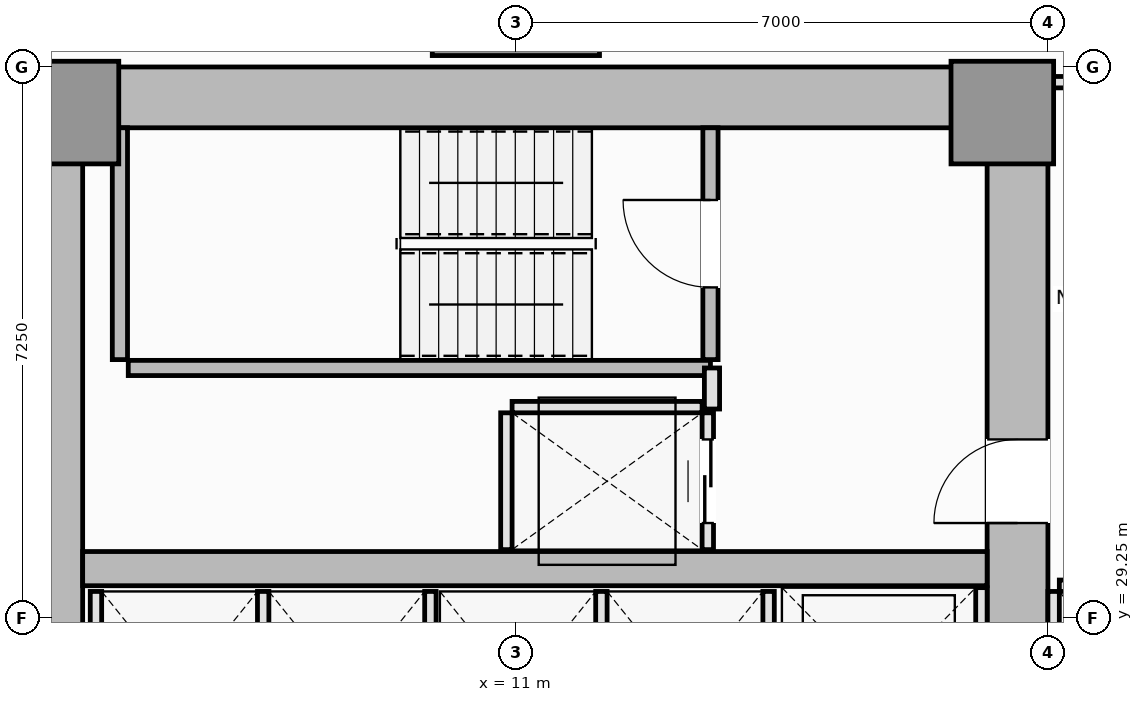
"""IFC4 building model, lengths in metres.
Left out: names, types, materials, properties, quantities, classifications, styles, units other than length and angle.
Written with IfcOpenShell. Run it as: python <this file> out.ifc"""

import sys

from ifc_helpers import new_model, si_unit, direction, frame, frame_2d, origin, origin_2d, place, context, subcontext, project, spatial, rectangle, extrude, element, fill, save


model = new_model("IFC4")
c1 = context("Model", 3, precision=1e-05, world=origin(), true_north=direction((0.0, 1.0)))
c2 = subcontext(c1, "Body", "Model", "MODEL_VIEW")
j1 = project(units=[si_unit("LENGTHUNIT", "METRE"), si_unit("PLANEANGLEUNIT", "RADIAN")], contexts=[c1])
p1 = place(None, origin())
s1 = spatial("IfcSite", under=j1, at=p1, CompositionType="ELEMENT")
p2 = place(p1, origin())
s2 = spatial("IfcBuilding", under=s1, at=p2, CompositionType="ELEMENT")
p3 = place(p2, frame((0.0, 0.0, 82.4)))
s3 = spatial("IfcBuildingStorey", under=s2, at=p3, CompositionType="ELEMENT", Elevation=82.4)
p4 = place(p3, frame((4.5, 36.1, 0.0), z_axis=(0.0, 0.0, 1.0), x_axis=(1.0, 0.0, 0.0)))
e1 = element("IfcWall", 1, at=p4, inside=s3, PredefinedType="SHEAR", context=c2, shape_type="SweptSolid", body=[
    extrude(rectangle(XDim=13.5, YDim=0.8, at=frame_2d((6.75, 0.0))), origin(), (0.0, 0.0, 1.0), 3.55),
])
p5 = place(p3, frame((4.9, 14.8, 0.0), z_axis=(0.0, 0.0, 1.0), x_axis=(0.0, 1.0, 0.0)))
e2 = element("IfcWall", 2, at=p5, inside=s3, PredefinedType="SHEAR", context=c2, shape_type="SweptSolid", body=[
    extrude(rectangle(XDim=20.9, YDim=0.8, at=frame_2d((10.45, 0.0))), origin(), (0.0, 0.0, 1.0), 3.55),
])
p6 = place(p3, frame((17.6, 27.05, 0.0), z_axis=(0.0, 0.0, 1.0), x_axis=(0.0, 1.0, 0.0)))
e3 = element("IfcWall", 3, at=p6, inside=s3, PredefinedType="SHEAR", context=c2, shape_type="SweptSolid", body=[
    extrude(rectangle(XDim=8.65, YDim=0.8, at=frame_2d((4.325, 0.0))), origin(), (0.0, 0.0, 1.0), 3.55),
])
p7 = place(p6, frame((3.45, 0.0, 0.0)))
e4 = element("IfcOpeningElement", 4, at=p7, cuts=e3, PredefinedType="OPENING", context=c2, shape_type="SweptSolid", body=[
    extrude(rectangle(XDim=1.1, YDim=2.15, at=frame_2d((0.55, 1.075))), frame((0.0, 0.41, 0.0), z_axis=(0.0, -1.0, 0.0), x_axis=(1.0, 0.0, 0.0)), (0.0, 0.0, 1.0), 0.82),
])
p8 = place(p3, frame((5.3, 29.9, 0.0), z_axis=(0.0, 0.0, 1.0), x_axis=(1.0, 0.0, 0.0)))
e5 = element("IfcWall", 5, at=p8, inside=s3, PredefinedType="SHEAR", context=c2, shape_type="SweptSolid", body=[
    extrude(rectangle(XDim=11.9, YDim=0.45, at=frame_2d((5.95, 0.0))), origin(), (0.0, 0.0, 1.0), 3.55),
])
for number, where, z_axis, x_axis in (
    (6, (5.1, 35.9, 0.0), (0.0, 0.0, 1.0), (1.0, 0.0, 0.0)),
    (7, (17.4, 35.9, 0.0), (0.0, 0.0, 1.0), (1.0, 0.0, 0.0)),
):
    element("IfcColumn", number, at=place(p3, frame(where, z_axis=z_axis, x_axis=x_axis)), inside=s3, PredefinedType="PILASTER", context=c2, shape_type="SweptSolid", body=[
        extrude(rectangle(XDim=1.35, YDim=1.35, at=origin_2d()), origin(), (0.0, 0.0, 1.0), 3.55),
    ])
p9 = place(p3, frame((11.0, 37.75, 0.0), z_axis=(0.0, 0.0, 1.0), x_axis=(1.0, 0.0, 0.0)))
e8 = element("IfcColumn", 8, at=p9, inside=s3, PredefinedType="COLUMN", context=c2, shape_type="SweptSolid", body=[
    extrude(rectangle(XDim=2.2, YDim=2.2, at=origin_2d()), origin(), (0.0, 0.0, 1.0), 3.55),
])
p10 = place(p3, frame((5.79, 32.65, 0.0), z_axis=(0.0, 0.0, 1.0), x_axis=(0.0, 1.0, 0.0)))
e9 = element("IfcWall", 9, at=p10, inside=s3, PredefinedType="SOLIDWALL", context=c2, shape_type="SweptSolid", body=[
    extrude(rectangle(XDim=3.05, YDim=0.2, at=frame_2d((1.525, 0.0))), origin(), (0.0, 0.0, 1.0), 3.55),
])
p11 = place(p3, frame((5.9, 32.54, 0.0), z_axis=(0.0, 0.0, 1.0), x_axis=(1.0, 0.0, 0.0)))
e10 = element("IfcWall", 10, at=p11, inside=s3, PredefinedType="SOLIDWALL", context=c2, shape_type="SweptSolid", body=[
    extrude(rectangle(XDim=7.66, YDim=0.2, at=frame_2d((3.83, 0.0))), origin(), (0.0, 0.0, 1.0), 3.55),
])
p12 = place(p3, frame((13.56, 32.65, 0.0), z_axis=(0.0, 0.0, 1.0), x_axis=(0.0, 1.0, 0.0)))
e11 = element("IfcWall", 11, at=p12, inside=s3, PredefinedType="SOLIDWALL", context=c2, shape_type="SweptSolid", body=[
    extrude(rectangle(XDim=3.05, YDim=0.2, at=frame_2d((1.525, 0.0))), origin(), (0.0, 0.0, 1.0), 3.55),
])
p13 = place(p12, frame((0.95, 0.0, 0.0)))
e12 = element("IfcOpeningElement", 12, at=p13, cuts=e11, PredefinedType="OPENING", context=c2, shape_type="SweptSolid", body=[
    extrude(rectangle(XDim=1.15, YDim=2.15, at=frame_2d((0.575, 1.075))), frame((0.0, 0.11, 0.0), z_axis=(0.0, -1.0, 0.0), x_axis=(1.0, 0.0, 0.0)), (0.0, 0.0, 1.0), 0.22),
])
p14 = place(p3, frame((18.15, 29.675, 0.0), z_axis=(0.0, 0.0, 1.0), x_axis=(1.0, 0.0, 0.0)))
e13 = element("IfcWall", 13, at=p14, inside=s3, PredefinedType="PARTITIONING", context=c2, shape_type="SweptSolid", body=[
    extrude(rectangle(XDim=2.05, YDim=0.15, at=frame_2d((1.025, 0.0))), origin(), (0.0, 0.0, 1.0), 3.37),
])
for number, where, z_axis, x_axis in (
    (14, (18.075, 27.05, 0.0), (0.0, 0.0, 1.0), (0.0, 1.0, 0.0)),
    (15, (5.475, 27.05, 0.0), (0.0, 0.0, 1.0), (0.0, 1.0, 0.0)),
    (16, (7.675, 27.05, 0.0), (0.0, 0.0, 1.0), (0.0, 1.0, 0.0)),
    (17, (9.875, 27.05, 0.0), (0.0, 0.0, 1.0), (0.0, 1.0, 0.0)),
    (18, (12.125, 27.05, 0.0), (0.0, 0.0, 1.0), (0.0, 1.0, 0.0)),
    (19, (14.325, 27.05, 0.0), (0.0, 0.0, 1.0), (0.0, 1.0, 0.0)),
):
    element("IfcWall", number, at=place(p3, frame(where, z_axis=z_axis, x_axis=x_axis)), inside=s3, PredefinedType="PARTITIONING", context=c2, shape_type="SweptSolid", body=[
        extrude(rectangle(XDim=2.55, YDim=0.15, at=frame_2d((1.275, 0.0))), origin(), (0.0, 0.0, 1.0), 3.37),
    ])
p15 = place(p3, frame((17.125, 27.05, 0.0), z_axis=(0.0, 0.0, 1.0), x_axis=(0.0, 1.0, 0.0)))
e20 = element("IfcWall", 20, at=p15, inside=s3, PredefinedType="PARTITIONING", context=c2, shape_type="SweptSolid", body=[
    extrude(rectangle(XDim=2.6, YDim=0.15, at=frame_2d((1.3, 0.0))), origin(), (0.0, 0.0, 1.0), 3.37),
])
p16 = place(p3, frame((10.95, 32.025, 0.0), z_axis=(0.0, 0.0, 1.0), x_axis=(1.0, 0.0, 0.0)))
e21 = element("IfcWall", 21, at=p16, inside=s3, PredefinedType="PARTITIONING", context=c2, shape_type="SweptSolid", body=[
    extrude(rectangle(XDim=2.5, YDim=0.15, at=frame_2d((1.25, 0.0))), origin(), (0.0, 0.0, 1.0), 3.37),
])
p17 = place(p3, frame((10.875, 30.15, 0.0), z_axis=(0.0, 0.0, 1.0), x_axis=(0.0, 1.0, 0.0)))
e22 = element("IfcWall", 22, at=p17, inside=s3, PredefinedType="PARTITIONING", context=c2, shape_type="SweptSolid", body=[
    extrude(rectangle(XDim=1.8, YDim=0.15, at=frame_2d((0.9, 0.0))), origin(), (0.0, 0.0, 1.0), 3.37),
])
p18 = place(p3, frame((13.525, 30.15, 0.0), z_axis=(0.0, 0.0, 1.0), x_axis=(0.0, 1.0, 0.0)))
e23 = element("IfcWall", 23, at=p18, inside=s3, PredefinedType="PARTITIONING", context=c2, shape_type="SweptSolid", body=[
    extrude(rectangle(XDim=1.8, YDim=0.15, at=frame_2d((0.9, 0.0))), origin(), (0.0, 0.0, 1.0), 3.37),
])
p19 = place(p18, frame((0.35, 0.0, 0.0)))
e24 = element("IfcOpeningElement", 24, at=p19, cuts=e23, PredefinedType="OPENING", context=c2, shape_type="SweptSolid", body=[
    extrude(rectangle(XDim=1.1, YDim=2.2, at=frame_2d((0.55, 1.1))), frame((0.0, 0.085, 0.0), z_axis=(0.0, -1.0, 0.0), x_axis=(1.0, 0.0, 0.0)), (0.0, 0.0, 1.0), 0.17),
])
p20 = place(p3, frame((13.58, 32.0, 0.0), z_axis=(0.0, 0.0, 1.0), x_axis=(0.0, 1.0, 0.0)))
e25 = element("IfcWall", 25, at=p20, inside=s3, PredefinedType="PARTITIONING", context=c2, shape_type="SweptSolid", body=[
    extrude(rectangle(XDim=0.54, YDim=0.2, at=frame_2d((0.27, 0.0))), origin(), (0.0, 0.0, 1.0), 3.37),
])
p21 = place(p3, frame((18.0, 36.3, 0.0), z_axis=(0.0, 0.0, 1.0), x_axis=(1.0, 0.0, 0.0)))
e26 = element("IfcWall", 26, at=p21, inside=s3, PredefinedType="PARTITIONING", context=c2, shape_type="SweptSolid", body=[
    extrude(rectangle(XDim=9.5, YDim=0.15, at=frame_2d((4.75, 0.0))), origin(), (0.0, 0.0, 1.0), 3.37),
])
p22 = place(p21, frame((4.25, 0.0, 0.0)))
e27 = element("IfcOpeningElement", 27, at=p22, cuts=e26, PredefinedType="OPENING", context=c2, shape_type="SweptSolid", body=[
    extrude(rectangle(XDim=1.0, YDim=2.15, at=frame_2d((0.5, 1.075))), frame((0.0, 0.085, 0.0), z_axis=(0.0, -1.0, 0.0), x_axis=(1.0, 0.0, 0.0)), (0.0, 0.0, 1.0), 0.17),
])
p23 = place(p13, origin())
e28 = element("IfcDoor", 28, at=p23, inside=s3, OperationType="SINGLE_SWING_RIGHT", PredefinedType="DOOR", context=c2, shape_type="SweptSolid", body=[
    extrude(rectangle(XDim=1.15, YDim=2.15, at=frame_2d((0.575, 1.075))), frame((0.0, 0.025, 0.0), z_axis=(0.0, -1.0, 0.0), x_axis=(1.0, 0.0, 0.0)), (0.0, 0.0, 1.0), 0.05),
])
fill(e12, e28)
p24 = place(p19, origin())
e29 = element("IfcDoor", 29, at=p24, inside=s3, OperationType="DOUBLE_DOOR_SLIDING", PredefinedType="DOOR", context=c2, shape_type="SweptSolid", body=[
    extrude(rectangle(XDim=1.1, YDim=2.2, at=frame_2d((0.55, 1.1))), frame((0.0, 0.025, 0.0), z_axis=(0.0, -1.0, 0.0), x_axis=(1.0, 0.0, 0.0)), (0.0, 0.0, 1.0), 0.05),
])
fill(e24, e29)
p25 = place(p7, origin())
e30 = element("IfcDoor", 30, at=p25, inside=s3, OperationType="SINGLE_SWING_LEFT", PredefinedType="DOOR", context=c2, shape_type="SweptSolid", body=[
    extrude(rectangle(XDim=1.1, YDim=2.15, at=frame_2d((0.55, 1.075))), frame((0.0, 0.025, 0.0), z_axis=(0.0, -1.0, 0.0), x_axis=(1.0, 0.0, 0.0)), (0.0, 0.0, 1.0), 0.05),
])
fill(e4, e30)
save(model, sys.argv[1])
